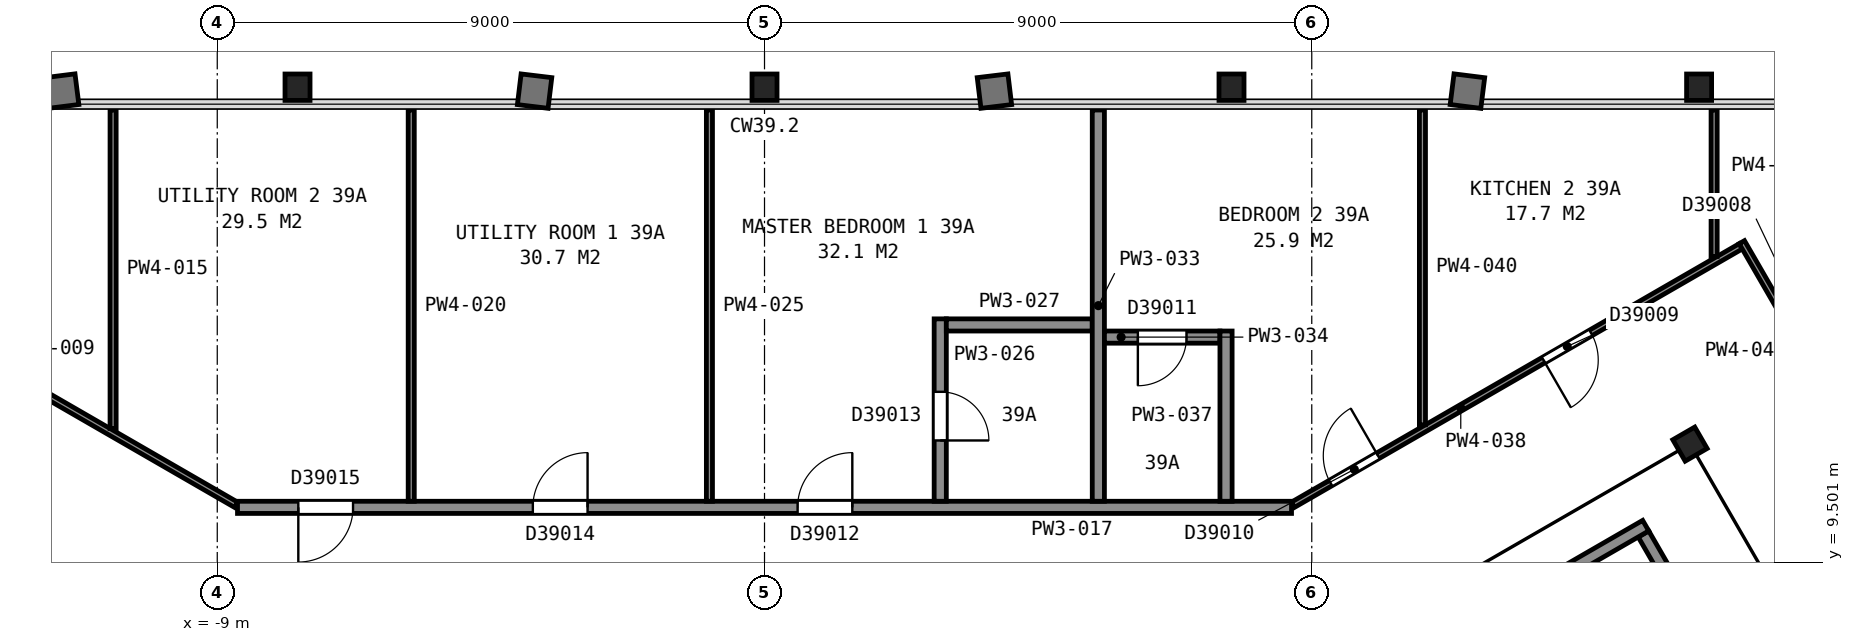
"""IFC4 building model, lengths in metres.
Left out: names, types, materials, properties, quantities, classifications, styles, units other than length and angle.
Written with IfcOpenShell. Run it as: python <this file> out.ifc"""

import sys

from ifc_helpers import new_model, si_unit, direction, frame, frame_2d, origin, origin_2d, place, context, subcontext, project, spatial, rectangle, i_section, extrude, element, fill, save


model = new_model("IFC4")
c1 = context("Model", 3, precision=1e-05, world=origin(), true_north=direction((0.0, 1.0)))
c2 = subcontext(c1, "Body", "Model", "MODEL_VIEW")
j1 = project(units=[si_unit("LENGTHUNIT", "METRE"), si_unit("PLANEANGLEUNIT", "RADIAN")], contexts=[c1])
p1 = place(None, origin())
s1 = spatial("IfcSite", under=j1, at=p1, CompositionType="ELEMENT")
p2 = place(p1, origin())
s2 = spatial("IfcBuilding", under=s1, at=p2, CompositionType="ELEMENT")
p3 = place(p2, frame((0.0, 0.0, 159.9)))
s3 = spatial("IfcBuildingStorey", under=s2, at=p3, CompositionType="ELEMENT", Elevation=159.9)
p4 = place(p3, frame((15.37, 17.31, 0.04), z_axis=(0.0, 0.0, 1.0), x_axis=(1.0, 0.0, 0.0)))
e1 = element("IfcColumn", 1, at=p4, inside=s3, PredefinedType="COLUMN", context=c2, shape_type="SweptSolid", body=[
    extrude(i_section(OverallWidth=0.411, OverallDepth=0.434, WebThickness=0.036, FlangeThickness=0.057, FilletRadius=0.015, at=origin_2d()), origin(), (0.0, 0.0, 1.0), 3.66),
])
for number, where, z_axis, x_axis in (
    (2, (7.68, 17.31, 0.035), (0.0, 0.0, 1.0), (1.0, 0.0, 0.0)),
    (3, (0.0, 17.31, 0.035), (0.0, 0.0, 1.0), (1.0, 0.0, 0.0)),
    (4, (-7.68, 17.31, 0.035), (0.0, 0.0, 1.0), (1.0, 0.0, 0.0)),
):
    element("IfcColumn", number, at=place(p3, frame(where, z_axis=z_axis, x_axis=x_axis)), inside=s3, PredefinedType="COLUMN", context=c2, shape_type="SweptSolid", body=[
        extrude(i_section(OverallWidth=0.411, OverallDepth=0.434, WebThickness=0.036, FlangeThickness=0.057, FilletRadius=0.015, at=origin_2d()), origin(), (0.0, 0.0, 1.0), 3.665),
    ])
p5 = place(p3, frame((15.22, 11.44, 0.0), z_axis=(0.0, 0.0, 1.0), x_axis=(0.5, -0.866025403784, 0.0)))
e5 = element("IfcColumn", 5, at=p5, inside=s3, PredefinedType="COLUMN", context=c2, shape_type="SweptSolid", body=[
    extrude(i_section(OverallWidth=0.406, OverallDepth=0.417, WebThickness=0.03, FlangeThickness=0.048, FilletRadius=0.015, at=origin_2d()), origin(), (0.0, 0.0, 1.0), 3.7),
])
p6 = place(p3, frame((15.855, 7.538, 0.0), z_axis=(0.0, 0.0, 1.0), x_axis=(-0.500049511043, 0.865996816683, 0.0)))
e6 = element("IfcWall", 6, at=p6, inside=s3, PredefinedType="PARTITIONING", context=c2, shape_type="SweptSolid", body=[
    extrude(rectangle(XDim=2.8, YDim=0.2, at=frame_2d((1.4, 0.0))), origin(), (0.0, 0.0, 1.0), 3.45),
])
p7 = place(p6, frame((0.85, 0.0, 0.0)))
e7 = element("IfcOpeningElement", 7, at=p7, cuts=e6, PredefinedType="OPENING", context=c2, shape_type="SweptSolid", body=[
    extrude(rectangle(XDim=1.1, YDim=2.1, at=frame_2d((0.55, 1.05))), frame((0.0, 0.11, 0.0), z_axis=(0.0, -1.0, 0.0), x_axis=(1.0, 0.0, 0.0)), (0.0, 0.0, 1.0), 0.22),
])
for number, where, z_axis, x_axis in (
    (8, (6.178, 5.299, 0.0), (0.0, 0.0, 1.0), (0.866, 0.5, 0.0)),
    (9, (-6.178, 5.299, 0.0), (0.0, 0.0, 1.0), (-0.866, 0.5, 0.0)),
):
    element("IfcWall", number, at=place(p3, frame(where, z_axis=z_axis, x_axis=x_axis)), inside=s3, PredefinedType="PARTITIONING", context=c2, shape_type="SweptSolid", body=[
        extrude(rectangle(XDim=9.6, YDim=0.2, at=frame_2d((4.8, 0.0))), origin(), (0.0, 0.0, 1.0), 3.45),
    ])
p8 = place(p3, frame((-16.055, 14.693, 0.0), z_axis=(0.0, 0.0, 1.0), x_axis=(0.866070360466, -0.499922124658, 0.0)))
e10 = element("IfcWall", 10, at=p8, inside=s3, PredefinedType="PARTITIONING", context=c2, shape_type="SweptSolid", body=[
    extrude(rectangle(XDim=8.503, YDim=0.1, at=frame_2d((4.251, 0.0))), origin(), (0.0, 0.0, 1.0), 2.713),
])
p9 = place(p3, frame((-10.713, 11.697, 0.0), z_axis=(0.0, 0.0, 1.0), x_axis=(0.0, 1.0, 0.0)))
e11 = element("IfcWall", 11, at=p9, inside=s3, PredefinedType="PARTITIONING", context=c2, shape_type="SweptSolid", body=[
    extrude(rectangle(XDim=5.239, YDim=0.1, at=frame_2d((2.619, 0.0))), origin(), (0.0, 0.0, 1.0), 2.713),
])
p10 = place(p3, frame((-8.667, 10.4, 0.0), z_axis=(0.0, 0.0, 1.0), x_axis=(1.0, 0.0, 0.0)))
e12 = element("IfcWall", 12, at=p10, inside=s3, PredefinedType="PARTITIONING", context=c2, shape_type="SweptSolid", body=[
    extrude(rectangle(XDim=17.334, YDim=0.2, at=frame_2d((8.667, 0.0))), origin(), (0.0, 0.0, 1.0), 2.713),
])
p11 = place(p10, frame((9.211, 0.0, 0.0)))
e13 = element("IfcOpeningElement", 13, at=p11, cuts=e12, PredefinedType="OPENING", context=c2, shape_type="SweptSolid", body=[
    extrude(rectangle(XDim=0.9, YDim=2.1, at=frame_2d((0.45, 1.05))), frame((0.0, 0.11, 0.0), z_axis=(0.0, -1.0, 0.0), x_axis=(1.0, 0.0, 0.0)), (0.0, 0.0, 1.0), 0.22),
])
p12 = place(p10, frame((4.857, 0.0, 0.0)))
e14 = element("IfcOpeningElement", 14, at=p12, cuts=e12, PredefinedType="OPENING", context=c2, shape_type="SweptSolid", body=[
    extrude(rectangle(XDim=0.9, YDim=2.1, at=frame_2d((0.45, 1.05))), frame((0.0, 0.11, 0.0), z_axis=(0.0, -1.0, 0.0), x_axis=(1.0, 0.0, 0.0)), (0.0, 0.0, 1.0), 0.22),
])
p13 = place(p10, frame((1.0, 0.0, 0.0)))
e15 = element("IfcOpeningElement", 15, at=p13, cuts=e12, PredefinedType="OPENING", context=c2, shape_type="SweptSolid", body=[
    extrude(rectangle(XDim=0.9, YDim=2.1, at=frame_2d((0.45, 1.05))), frame((0.0, 0.11, 0.0), z_axis=(0.0, -1.0, 0.0), x_axis=(1.0, 0.0, 0.0)), (0.0, 0.0, 1.0), 0.22),
])
for number, where, z_axis, x_axis in (
    (16, (-5.81, 10.5, 0.0), (0.0, 0.0, 1.0), (0.0, 1.0, 0.0)),
    (17, (-0.906, 10.5, 0.0), (0.0, 0.0, 1.0), (0.0, 1.0, 0.0)),
):
    element("IfcWall", number, at=place(p3, frame(where, z_axis=z_axis, x_axis=x_axis)), inside=s3, PredefinedType="PARTITIONING", context=c2, shape_type="SweptSolid", body=[
        extrude(rectangle(XDim=6.435, YDim=0.1, at=frame_2d((3.218, 0.0))), origin(), (0.0, 0.0, 1.0), 2.713),
    ])
p14 = place(p3, frame((2.89, 13.5, 0.0), z_axis=(0.0, 0.0, 1.0), x_axis=(0.0, -1.0, 0.0)))
e18 = element("IfcWall", 18, at=p14, inside=s3, PredefinedType="PARTITIONING", context=c2, shape_type="SweptSolid", body=[
    extrude(rectangle(XDim=3.0, YDim=0.2, at=frame_2d((1.5, 0.0))), origin(), (0.0, 0.0, 1.0), 2.713),
])
p15 = place(p14, frame((1.2, 0.0, 0.0)))
e19 = element("IfcOpeningElement", 19, at=p15, cuts=e18, PredefinedType="OPENING", context=c2, shape_type="SweptSolid", body=[
    extrude(rectangle(XDim=0.8, YDim=2.1, at=frame_2d((0.4, 1.05))), frame((0.0, 0.11, 0.0), z_axis=(0.0, -1.0, 0.0), x_axis=(1.0, 0.0, 0.0)), (0.0, 0.0, 1.0), 0.22),
])
p16 = place(p3, frame((2.99, 13.4, 0.0), z_axis=(0.0, 0.0, 1.0), x_axis=(1.0, 0.0, 0.0)))
e20 = element("IfcWall", 20, at=p16, inside=s3, PredefinedType="PARTITIONING", context=c2, shape_type="SweptSolid", body=[
    extrude(rectangle(XDim=2.4, YDim=0.2, at=frame_2d((1.2, 0.0))), origin(), (0.0, 0.0, 1.0), 2.713),
])
p17 = place(p3, frame((5.49, 10.5, 0.0), z_axis=(0.0, 0.0, 1.0), x_axis=(0.0, 1.0, 0.0)))
e21 = element("IfcWall", 21, at=p17, inside=s3, PredefinedType="PARTITIONING", context=c2, shape_type="SweptSolid", body=[
    extrude(rectangle(XDim=6.435, YDim=0.2, at=frame_2d((3.218, 0.0))), origin(), (0.0, 0.0, 1.0), 2.713),
])
p18 = place(p3, frame((7.49, 13.2, 0.0), z_axis=(0.0, 0.0, 1.0), x_axis=(-1.0, 0.0, 0.0)))
e22 = element("IfcWall", 22, at=p18, inside=s3, PredefinedType="PARTITIONING", context=c2, shape_type="SweptSolid", body=[
    extrude(rectangle(XDim=1.9, YDim=0.2, at=frame_2d((0.95, 0.0))), origin(), (0.0, 0.0, 1.0), 2.713),
])
p19 = place(p18, frame((0.55, 0.0, 0.0)))
e23 = element("IfcOpeningElement", 23, at=p19, cuts=e22, PredefinedType="OPENING", context=c2, shape_type="SweptSolid", body=[
    extrude(rectangle(XDim=0.8, YDim=2.1, at=frame_2d((0.4, 1.05))), frame((0.0, 0.11, 0.0), z_axis=(0.0, -1.0, 0.0), x_axis=(1.0, 0.0, 0.0)), (0.0, 0.0, 1.0), 0.22),
])
p20 = place(p3, frame((7.59, 10.5, 0.0), z_axis=(0.0, 0.0, 1.0), x_axis=(0.0, 1.0, 0.0)))
e24 = element("IfcWall", 24, at=p20, inside=s3, PredefinedType="PARTITIONING", context=c2, shape_type="SweptSolid", body=[
    extrude(rectangle(XDim=2.8, YDim=0.2, at=frame_2d((1.4, 0.0))), origin(), (0.0, 0.0, 1.0), 2.713),
])
p21 = place(p3, frame((8.691, 10.442, 0.0), z_axis=(0.0, 0.0, 1.0), x_axis=(0.866070360466, 0.499922124658, 0.0)))
e25 = element("IfcWall", 25, at=p21, inside=s3, PredefinedType="PARTITIONING", context=c2, shape_type="SweptSolid", body=[
    extrude(rectangle(XDim=8.503, YDim=0.1, at=frame_2d((4.251, 0.0))), origin(), (0.0, 0.0, 1.0), 2.713),
])
p22 = place(p21, frame((4.758, 0.0, 0.0)))
e26 = element("IfcOpeningElement", 26, at=p22, cuts=e25, PredefinedType="OPENING", context=c2, shape_type="SweptSolid", body=[
    extrude(rectangle(XDim=0.9, YDim=2.1, at=frame_2d((0.45, 1.05))), frame((0.0, 0.06, 0.0), z_axis=(0.0, -1.0, 0.0), x_axis=(1.0, 0.0, 0.0)), (0.0, 0.0, 1.0), 0.12),
])
p23 = place(p21, frame((0.715, 0.0, 0.0)))
e27 = element("IfcOpeningElement", 27, at=p23, cuts=e25, PredefinedType="OPENING", context=c2, shape_type="SweptSolid", body=[
    extrude(rectangle(XDim=0.9, YDim=2.1, at=frame_2d((0.45, 1.05))), frame((0.0, 0.06, 0.0), z_axis=(0.0, -1.0, 0.0), x_axis=(1.0, 0.0, 0.0)), (0.0, 0.0, 1.0), 0.12),
])
p24 = place(p3, frame((10.82, 11.758, 0.0), z_axis=(0.0, 0.0, 1.0), x_axis=(0.0, 1.0, 0.0)))
e28 = element("IfcWall", 28, at=p24, inside=s3, PredefinedType="PARTITIONING", context=c2, shape_type="SweptSolid", body=[
    extrude(rectangle(XDim=5.177, YDim=0.1, at=frame_2d((2.589, 0.0))), origin(), (0.0, 0.0, 1.0), 2.713),
])
p25 = place(p3, frame((15.617, 14.527, 0.0), z_axis=(0.0, 0.0, 1.0), x_axis=(0.0, 1.0, 0.0)))
e29 = element("IfcWall", 29, at=p25, inside=s3, PredefinedType="PARTITIONING", context=c2, shape_type="SweptSolid", body=[
    extrude(rectangle(XDim=2.408, YDim=0.1, at=frame_2d((1.204, 0.0))), origin(), (0.0, 0.0, 1.0), 2.713),
])
p26 = place(p3, frame((16.073, 14.761, 0.0), z_axis=(0.0, 0.0, 1.0), x_axis=(0.500297300687, -0.865853689098, 0.0)))
e30 = element("IfcWall", 30, at=p26, inside=s3, PredefinedType="PARTITIONING", context=c2, shape_type="SweptSolid", body=[
    extrude(rectangle(XDim=9.496, YDim=0.1, at=frame_2d((4.748, 0.0))), origin(), (0.0, 0.0, 1.0), 2.713),
])
p27 = place(p26, frame((4.15, 0.0, 0.0)))
e31 = element("IfcOpeningElement", 31, at=p27, cuts=e30, PredefinedType="OPENING", context=c2, shape_type="SweptSolid", body=[
    extrude(rectangle(XDim=1.2, YDim=2.1, at=frame_2d((0.6, 1.05))), frame((0.0, 0.06, 0.0), z_axis=(0.0, -1.0, 0.0), x_axis=(1.0, 0.0, 0.0)), (0.0, 0.0, 1.0), 0.12),
])
p28 = place(p11, origin())
e32 = element("IfcDoor", 32, at=p28, inside=s3, OperationType="SINGLE_SWING_RIGHT", PredefinedType="DOOR", context=c2, shape_type="SweptSolid", body=[
    extrude(rectangle(XDim=0.9, YDim=2.1, at=frame_2d((0.45, 1.05))), frame((0.0, 0.025, 0.0), z_axis=(0.0, -1.0, 0.0), x_axis=(1.0, 0.0, 0.0)), (0.0, 0.0, 1.0), 0.05),
])
fill(e13, e32)
p29 = place(p12, origin())
e33 = element("IfcDoor", 33, at=p29, inside=s3, OperationType="SINGLE_SWING_RIGHT", PredefinedType="DOOR", context=c2, shape_type="SweptSolid", body=[
    extrude(rectangle(XDim=0.9, YDim=2.1, at=frame_2d((0.45, 1.05))), frame((0.0, 0.025, 0.0), z_axis=(0.0, -1.0, 0.0), x_axis=(1.0, 0.0, 0.0)), (0.0, 0.0, 1.0), 0.05),
])
fill(e14, e33)
p30 = place(p13, origin())
e34 = element("IfcDoor", 34, at=p30, inside=s3, OperationType="SINGLE_SWING_LEFT", PredefinedType="DOOR", context=c2, shape_type="SweptSolid", body=[
    extrude(rectangle(XDim=0.9, YDim=2.1, at=frame_2d((0.45, 1.05))), frame((0.0, 0.025, 0.0), z_axis=(0.0, -1.0, 0.0), x_axis=(1.0, 0.0, 0.0)), (0.0, 0.0, 1.0), 0.05),
])
fill(e15, e34)
p31 = place(p15, origin())
e35 = element("IfcDoor", 35, at=p31, inside=s3, OperationType="SINGLE_SWING_RIGHT", PredefinedType="DOOR", context=c2, shape_type="SweptSolid", body=[
    extrude(rectangle(XDim=0.8, YDim=2.1, at=frame_2d((0.4, 1.05))), frame((0.0, 0.025, 0.0), z_axis=(0.0, -1.0, 0.0), x_axis=(1.0, 0.0, 0.0)), (0.0, 0.0, 1.0), 0.05),
])
fill(e19, e35)
p32 = place(p19, origin())
e36 = element("IfcDoor", 36, at=p32, inside=s3, OperationType="SINGLE_SWING_RIGHT", PredefinedType="DOOR", context=c2, shape_type="SweptSolid", body=[
    extrude(rectangle(XDim=0.8, YDim=2.1, at=frame_2d((0.4, 1.05))), frame((0.0, 0.025, 0.0), z_axis=(0.0, -1.0, 0.0), x_axis=(1.0, 0.0, 0.0)), (0.0, 0.0, 1.0), 0.05),
])
fill(e23, e36)
p33 = place(p22, origin())
e37 = element("IfcDoor", 37, at=p33, inside=s3, OperationType="SINGLE_SWING_LEFT", PredefinedType="DOOR", context=c2, shape_type="SweptSolid", body=[
    extrude(rectangle(XDim=0.9, YDim=2.1, at=frame_2d((0.45, 1.05))), frame((0.0, 0.025, 0.0), z_axis=(0.0, -1.0, 0.0), x_axis=(1.0, 0.0, 0.0)), (0.0, 0.0, 1.0), 0.05),
])
fill(e26, e37)
p34 = place(p23, origin())
e38 = element("IfcDoor", 38, at=p34, inside=s3, OperationType="SINGLE_SWING_RIGHT", PredefinedType="DOOR", context=c2, shape_type="SweptSolid", body=[
    extrude(rectangle(XDim=0.9, YDim=2.1, at=frame_2d((0.45, 1.05))), frame((0.0, 0.025, 0.0), z_axis=(0.0, -1.0, 0.0), x_axis=(1.0, 0.0, 0.0)), (0.0, 0.0, 1.0), 0.05),
])
fill(e27, e38)
save(model, sys.argv[1])
